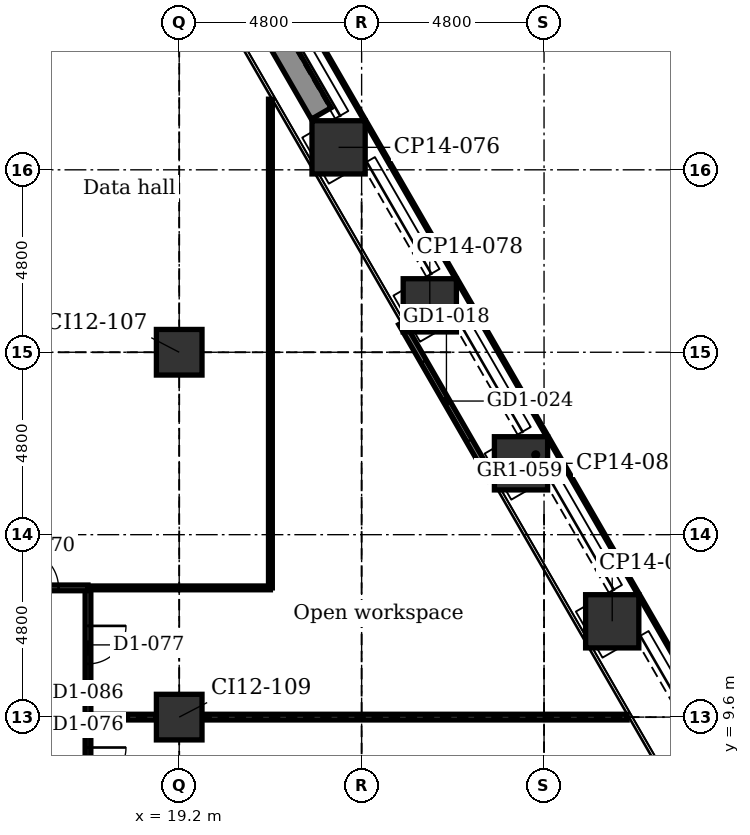
"""IFC4 building model, lengths in metres.
Left out: names, types, materials, properties, quantities, classifications, styles, units other than length and angle.
Written with IfcOpenShell. Run it as: python <this file> out.ifc"""

import sys

from ifc_helpers import new_model, si_unit, direction, frame, frame_2d, origin, origin_2d, place, context, subcontext, project, spatial, rectangle, extrude, element, fill, save


model = new_model("IFC4")
c1 = context("Model", 3, precision=1e-05, world=origin(), true_north=direction((0.0, 1.0)))
c2 = subcontext(c1, "Body", "Model", "MODEL_VIEW")
j1 = project(units=[si_unit("LENGTHUNIT", "METRE"), si_unit("PLANEANGLEUNIT", "RADIAN")], contexts=[c1])
p1 = place(None, origin())
s1 = spatial("IfcSite", under=j1, at=p1, CompositionType="ELEMENT")
p2 = place(p1, origin())
s2 = spatial("IfcBuilding", under=s1, at=p2, CompositionType="ELEMENT")
p3 = place(p2, frame((0.0, 0.0, 22.4)))
s3 = spatial("IfcBuildingStorey", under=s2, at=p3, CompositionType="ELEMENT", Elevation=22.4)
for number, where, z_axis, x_axis in (
    (1, (23.394, 24.592, -0.25), (0.0, 0.0, 1.0), (0.866, 0.5, 0.0)),
    (2, (25.794, 20.435, -0.25), (0.0, 0.0, 1.0), (0.866, 0.5, 0.0)),
    (3, (28.194, 16.278, -0.25), (0.0, 0.0, 1.0), (0.866, 0.5, 0.0)),
    (4, (30.594, 12.121, -0.25), (0.0, 0.0, 1.0), (0.866, 0.5, 0.0)),
    (5, (32.994, 7.964, -0.25), (0.0, 0.0, 1.0), (0.866, 0.5, 0.0)),
):
    element("IfcColumn", number, at=place(p3, frame(where, z_axis=z_axis, x_axis=x_axis)), inside=s3, PredefinedType="COLUMN", context=c2, shape_type="SweptSolid", body=[
        extrude(rectangle(XDim=1.4, YDim=1.4, at=origin_2d()), origin(), (0.0, 0.0, 1.0), 5.5),
    ])
for number, where, z_axis, x_axis in (
    (6, (19.2, 9.6, -0.25), (0.0, 0.0, 1.0), (1.0, 0.0, 0.0)),
    (7, (19.2, 19.2, -0.25), (0.0, 0.0, 1.0), (1.0, 0.0, 0.0)),
):
    element("IfcColumn", number, at=place(p3, frame(where, z_axis=z_axis, x_axis=x_axis)), inside=s3, PredefinedType="COLUMN", context=c2, shape_type="SweptSolid", body=[
        extrude(rectangle(XDim=1.2, YDim=1.2, at=origin_2d()), origin(), (0.0, 0.0, 1.0), 5.5),
    ])
p4 = place(p3, frame((25.047, 19.969, 0.0), z_axis=(0.0, 0.0, 1.0), x_axis=(0.5000167099, -0.866015756104, 0.0)))
e8 = element("IfcWall", 8, at=p4, inside=s3, PredefinedType="PARTITIONING", context=c2, shape_type="SweptSolid", body=[
    extrude(rectangle(XDim=4.74, YDim=0.16, at=frame_2d((2.37, 0.0))), origin(), (0.0, 0.0, 1.0), 5.25),
])
p5 = place(p4, frame((1.17, 0.0, 0.0)))
e9 = element("IfcOpeningElement", 9, at=p5, cuts=e8, PredefinedType="OPENING", context=c2, shape_type="SweptSolid", body=[
    extrude(rectangle(XDim=2.4, YDim=2.4, at=frame_2d((1.2, 1.2))), frame((0.0, 0.09, 0.0), z_axis=(0.0, -1.0, 0.0), x_axis=(1.0, 0.0, 0.0)), (0.0, 0.0, 1.0), 0.18),
])
p6 = place(p3, frame((21.537, 27.907, 0.0), z_axis=(0.0, 0.0, 1.0), x_axis=(0.49998411664, -0.866034573852, 0.0)))
e10 = element("IfcWall", 10, at=p6, inside=s3, PredefinedType="USERDEFINED", context=c2, shape_type="SweptSolid", body=[
    extrude(rectangle(XDim=2.8, YDim=0.6, at=frame_2d((1.4, 0.0))), origin(), (0.0, 0.0, 1.0), 0.7),
])
p7 = place(p3, frame((21.6, 13.0, 0.0), z_axis=(0.0, 0.0, 1.0), x_axis=(0.0, 1.0, 0.0)))
e11 = element("IfcWall", 11, at=p7, inside=s3, PredefinedType="PARTITIONING", context=c2, shape_type="SweptSolid", body=[
    extrude(rectangle(XDim=12.858, YDim=0.1, at=frame_2d((6.429, 0.0))), origin(), (0.0, 0.0, 1.0), 5.25),
])
p8 = place(p3, frame((16.8, 3.95, 0.0), z_axis=(0.0, 0.0, 1.0), x_axis=(0.0, 1.0, 0.0)))
e12 = element("IfcWall", 12, at=p8, inside=s3, PredefinedType="PARTITIONING", context=c2, shape_type="SweptSolid", body=[
    extrude(rectangle(XDim=9.05, YDim=0.15, at=frame_2d((4.525, 0.0))), origin(), (0.0, 0.0, 1.0), 5.25),
])
p9 = place(p8, frame((0.755, 0.0, 0.0)))
e13 = element("IfcOpeningElement", 13, at=p9, cuts=e12, PredefinedType="OPENING", context=c2, shape_type="SweptSolid", body=[
    extrude(rectangle(XDim=1.0, YDim=2.1, at=frame_2d((0.5, 1.05))), frame((0.0, 0.085, 0.0), z_axis=(0.0, -1.0, 0.0), x_axis=(1.0, 0.0, 0.0)), (0.0, 0.0, 1.0), 0.17),
])
p10 = place(p8, frame((3.85, 0.0, 0.0)))
e14 = element("IfcOpeningElement", 14, at=p10, cuts=e12, PredefinedType="OPENING", context=c2, shape_type="SweptSolid", body=[
    extrude(rectangle(XDim=1.0, YDim=2.1, at=frame_2d((0.5, 1.05))), frame((0.0, 0.085, 0.0), z_axis=(0.0, -1.0, 0.0), x_axis=(1.0, 0.0, 0.0)), (0.0, 0.0, 1.0), 0.17),
])
p11 = place(p8, frame((7.05, 0.0, 0.0)))
e15 = element("IfcOpeningElement", 15, at=p11, cuts=e12, PredefinedType="OPENING", context=c2, shape_type="SweptSolid", body=[
    extrude(rectangle(XDim=1.0, YDim=2.1, at=frame_2d((0.5, 1.05))), frame((0.0, 0.085, 0.0), z_axis=(0.0, -1.0, 0.0), x_axis=(1.0, 0.0, 0.0)), (0.0, 0.0, 1.0), 0.17),
])
p12 = place(p3, frame((16.8, 9.6, 0.0), z_axis=(0.0, 0.0, 1.0), x_axis=(1.0, 0.0, 0.0)))
e16 = element("IfcWall", 16, at=p12, inside=s3, PredefinedType="PARTITIONING", context=c2, shape_type="SweptSolid", body=[
    extrude(rectangle(XDim=1.8, YDim=0.15, at=frame_2d((0.9, 0.0))), origin(), (0.0, 0.0, 1.0), 4.642),
])
p13 = place(p3, frame((19.8, 9.6, 0.0), z_axis=(0.0, 0.0, 1.0), x_axis=(1.0, 0.0, 0.0)))
e17 = element("IfcWall", 17, at=p13, inside=s3, PredefinedType="PARTITIONING", context=c2, shape_type="SweptSolid", body=[
    extrude(rectangle(XDim=11.187, YDim=0.15, at=frame_2d((5.593, 0.0))), origin(), (0.0, 0.0, 1.0), 4.488),
])
p14 = place(p3, frame((16.8, 13.0, 0.0), z_axis=(0.0, 0.0, 1.0), x_axis=(1.0, 0.0, 0.0)))
e18 = element("IfcWall", 18, at=p14, inside=s3, PredefinedType="PARTITIONING", context=c2, shape_type="SweptSolid", body=[
    extrude(rectangle(XDim=4.8, YDim=0.1, at=frame_2d((2.4, 0.0))), origin(), (0.0, 0.0, 1.0), 5.25),
])
p15 = place(p3, frame((-21.6, 13.0, 0.0), z_axis=(0.0, 0.0, 1.0), x_axis=(1.0, 0.0, 0.0)))
e19 = element("IfcWall", 19, at=p15, inside=s3, PredefinedType="PARTITIONING", context=c2, shape_type="SweptSolid", body=[
    extrude(rectangle(XDim=38.4, YDim=0.15, at=frame_2d((19.2, 0.0))), origin(), (0.0, 0.0, 1.0), 5.25),
])
p16 = place(p15, frame((5.5, 0.0, 0.0)))
e20 = element("IfcOpeningElement", 20, at=p16, cuts=e19, PredefinedType="OPENING", context=c2, shape_type="SweptSolid", body=[
    extrude(rectangle(XDim=1.0, YDim=2.1, at=frame_2d((0.5, 1.05))), frame((0.0, 0.085, 0.0), z_axis=(0.0, -1.0, 0.0), x_axis=(1.0, 0.0, 0.0)), (0.0, 0.0, 1.0), 0.17),
])
p17 = place(p15, frame((9.825, 0.0, 0.0)))
e21 = element("IfcOpeningElement", 21, at=p17, cuts=e19, PredefinedType="OPENING", context=c2, shape_type="SweptSolid", body=[
    extrude(rectangle(XDim=1.0, YDim=2.1, at=frame_2d((0.5, 1.05))), frame((0.0, 0.085, 0.0), z_axis=(0.0, -1.0, 0.0), x_axis=(1.0, 0.0, 0.0)), (0.0, 0.0, 1.0), 0.17),
])
p18 = place(p15, frame((16.3, 0.0, 0.0)))
e22 = element("IfcOpeningElement", 22, at=p18, cuts=e19, PredefinedType="OPENING", context=c2, shape_type="SweptSolid", body=[
    extrude(rectangle(XDim=1.0, YDim=2.1, at=frame_2d((0.5, 1.05))), frame((0.0, 0.085, 0.0), z_axis=(0.0, -1.0, 0.0), x_axis=(1.0, 0.0, 0.0)), (0.0, 0.0, 1.0), 0.17),
])
p19 = place(p15, frame((22.155, 0.0, 0.0)))
e23 = element("IfcOpeningElement", 23, at=p19, cuts=e19, PredefinedType="OPENING", context=c2, shape_type="SweptSolid", body=[
    extrude(rectangle(XDim=1.8, YDim=2.1, at=frame_2d((0.9, 1.05))), frame((0.0, 0.085, 0.0), z_axis=(0.0, -1.0, 0.0), x_axis=(1.0, 0.0, 0.0)), (0.0, 0.0, 1.0), 0.17),
])
p20 = place(p15, frame((32.375, 0.0, 0.0)))
e24 = element("IfcOpeningElement", 24, at=p20, cuts=e19, PredefinedType="OPENING", context=c2, shape_type="SweptSolid", body=[
    extrude(rectangle(XDim=1.0, YDim=2.1, at=frame_2d((0.5, 1.05))), frame((0.0, 0.085, 0.0), z_axis=(0.0, -1.0, 0.0), x_axis=(1.0, 0.0, 0.0)), (0.0, 0.0, 1.0), 0.17),
])
p21 = place(p15, frame((36.625, 0.0, 0.0)))
e25 = element("IfcOpeningElement", 25, at=p21, cuts=e19, PredefinedType="OPENING", context=c2, shape_type="SweptSolid", body=[
    extrude(rectangle(XDim=1.0, YDim=2.1, at=frame_2d((0.5, 1.05))), frame((0.0, 0.085, 0.0), z_axis=(0.0, -1.0, 0.0), x_axis=(1.0, 0.0, 0.0)), (0.0, 0.0, 1.0), 0.17),
])
p22 = place(p15, frame((28.35, 0.0, 0.0)))
e26 = element("IfcOpeningElement", 26, at=p22, cuts=e19, PredefinedType="OPENING", context=c2, shape_type="SweptSolid", body=[
    extrude(rectangle(XDim=0.9, YDim=2.1, at=frame_2d((0.45, 1.05))), frame((0.0, 0.085, 0.0), z_axis=(0.0, -1.0, 0.0), x_axis=(1.0, 0.0, 0.0)), (0.0, 0.0, 1.0), 0.17),
])
p23 = place(p15, frame((25.35, 0.0, 0.0)))
e27 = element("IfcOpeningElement", 27, at=p23, cuts=e19, PredefinedType="OPENING", context=c2, shape_type="SweptSolid", body=[
    extrude(rectangle(XDim=0.9, YDim=2.1, at=frame_2d((0.45, 1.05))), frame((0.0, 0.085, 0.0), z_axis=(0.0, -1.0, 0.0), x_axis=(1.0, 0.0, 0.0)), (0.0, 0.0, 1.0), 0.17),
])
p24 = place(p5, origin())
e28 = element("IfcDoor", 28, at=p24, inside=s3, OperationType="DOUBLE_DOOR_SLIDING", PredefinedType="DOOR", context=c2, shape_type="SweptSolid", body=[
    extrude(rectangle(XDim=2.4, YDim=2.4, at=frame_2d((1.2, 1.2))), frame((0.0, 0.025, 0.0), z_axis=(0.0, -1.0, 0.0), x_axis=(1.0, 0.0, 0.0)), (0.0, 0.0, 1.0), 0.05),
])
fill(e9, e28)
p25 = place(p21, origin())
e29 = element("IfcDoor", 29, at=p25, inside=s3, OperationType="SINGLE_SWING_LEFT", PredefinedType="DOOR", context=c2, shape_type="SweptSolid", body=[
    extrude(rectangle(XDim=1.0, YDim=2.1, at=frame_2d((0.5, 1.05))), frame((0.0, 0.025, 0.0), z_axis=(0.0, -1.0, 0.0), x_axis=(1.0, 0.0, 0.0)), (0.0, 0.0, 1.0), 0.05),
])
fill(e25, e29)
p26 = place(p10, frame((1.0, 0.0, 0.0), z_axis=(0.0, 0.0, 1.0), x_axis=(-1.0, 0.0, 0.0)))
e30 = element("IfcDoor", 30, at=p26, inside=s3, OperationType="SINGLE_SWING_RIGHT", PredefinedType="DOOR", context=c2, shape_type="SweptSolid", body=[
    extrude(rectangle(XDim=1.0, YDim=2.1, at=frame_2d((0.5, 1.05))), frame((0.0, 0.025, 0.0), z_axis=(0.0, -1.0, 0.0), x_axis=(1.0, 0.0, 0.0)), (0.0, 0.0, 1.0), 0.05),
])
fill(e14, e30)
p27 = place(p11, frame((1.0, 0.0, 0.0), z_axis=(0.0, 0.0, 1.0), x_axis=(-1.0, 0.0, 0.0)))
e31 = element("IfcDoor", 31, at=p27, inside=s3, OperationType="SINGLE_SWING_RIGHT", PredefinedType="DOOR", context=c2, shape_type="SweptSolid", body=[
    extrude(rectangle(XDim=1.0, YDim=2.1, at=frame_2d((0.5, 1.05))), frame((0.0, 0.025, 0.0), z_axis=(0.0, -1.0, 0.0), x_axis=(1.0, 0.0, 0.0)), (0.0, 0.0, 1.0), 0.05),
])
fill(e15, e31)
save(model, sys.argv[1])
